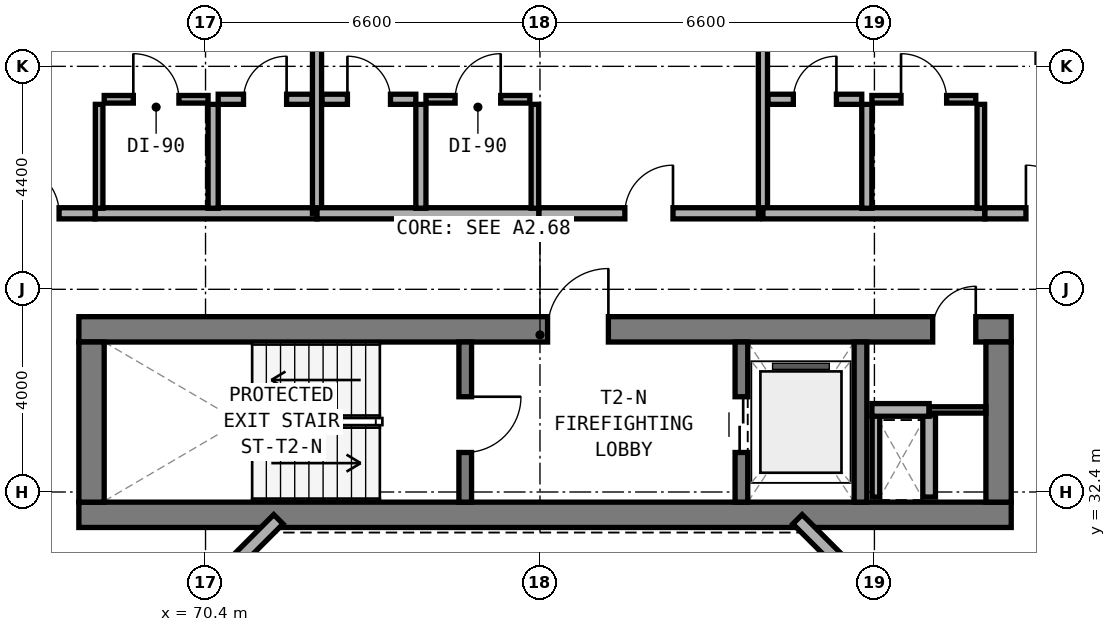
"""IFC4 building model, lengths in metres.
Left out: names, types, materials, properties, quantities, classifications, styles, units other than length and angle.
Written with IfcOpenShell. Run it as: python <this file> out.ifc"""

import sys

from ifc_helpers import new_model, si_unit, direction, frame, frame_2d, origin, place, context, subcontext, project, spatial, rectangle, extrude, element, fill, save


model = new_model("IFC4")
c1 = context("Model", 3, precision=1e-05, world=origin(), true_north=direction((0.0, 1.0)))
c2 = subcontext(c1, "Body", "Model", "MODEL_VIEW")
j1 = project(units=[si_unit("LENGTHUNIT", "METRE"), si_unit("PLANEANGLEUNIT", "RADIAN")], contexts=[c1])
p1 = place(None, origin())
s1 = spatial("IfcSite", under=j1, at=p1, CompositionType="ELEMENT")
p2 = place(p1, origin())
s2 = spatial("IfcBuilding", under=s1, at=p2, CompositionType="ELEMENT")
p3 = place(p2, frame((0.0, 0.0, 73.0)))
s3 = spatial("IfcBuildingStorey", under=s2, at=p3, CompositionType="ELEMENT", Elevation=73.0)
p4 = place(p3, frame((67.9, 31.95, 0.0), z_axis=(0.0, 0.0, 1.0), x_axis=(1.0, 0.0, 0.0)))
e1 = element("IfcWall", 1, at=p4, inside=s3, PredefinedType="SHEAR", context=c2, shape_type="SweptSolid", body=[
    extrude(rectangle(XDim=18.4, YDim=0.5, at=frame_2d((9.2, 0.0))), origin(), (0.0, 0.0, 1.0), 3.5),
])
p5 = place(p3, frame((67.9, 35.61, 0.0), z_axis=(0.0, 0.0, 1.0), x_axis=(1.0, 0.0, 0.0)))
e2 = element("IfcWall", 2, at=p5, inside=s3, PredefinedType="SHEAR", context=c2, shape_type="SweptSolid", body=[
    extrude(rectangle(XDim=18.4, YDim=0.5, at=frame_2d((9.2, 0.0))), origin(), (0.0, 0.0, 1.0), 3.5),
])
p6 = place(p5, frame((9.25, 0.0, 0.0)))
e3 = element("IfcOpeningElement", 3, at=p6, cuts=e2, PredefinedType="OPENING", context=c2, shape_type="SweptSolid", body=[
    extrude(rectangle(XDim=1.2, YDim=2.15, at=frame_2d((0.6, 1.075))), frame((0.0, 0.26, 0.0), z_axis=(0.0, -1.0, 0.0), x_axis=(1.0, 0.0, 0.0)), (0.0, 0.0, 1.0), 0.52),
])
p7 = place(p5, frame((16.85, 0.0, 0.0)))
e4 = element("IfcOpeningElement", 4, at=p7, cuts=e2, PredefinedType="OPENING", context=c2, shape_type="SweptSolid", body=[
    extrude(rectangle(XDim=0.85, YDim=2.1, at=frame_2d((0.425, 1.05))), frame((0.0, 0.26, 0.0), z_axis=(0.0, -1.0, 0.0), x_axis=(1.0, 0.0, 0.0)), (0.0, 0.0, 1.0), 0.52),
])
for number, where, z_axis, x_axis in (
    (5, (68.15, 32.2, 0.0), (0.0, 0.0, 1.0), (0.0, 1.0, 0.0)),
    (6, (86.05, 32.2, 0.0), (0.0, 0.0, 1.0), (0.0, 1.0, 0.0)),
):
    element("IfcWall", number, at=place(p3, frame(where, z_axis=z_axis, x_axis=x_axis)), inside=s3, PredefinedType="SHEAR", context=c2, shape_type="SweptSolid", body=[
        extrude(rectangle(XDim=3.16, YDim=0.5, at=frame_2d((1.58, 0.0))), origin(), (0.0, 0.0, 1.0), 3.5),
    ])
p8 = place(p3, frame((75.525, 32.2, 0.0), z_axis=(0.0, 0.0, 1.0), x_axis=(0.0, 1.0, 0.0)))
e7 = element("IfcWall", 7, at=p8, inside=s3, PredefinedType="STANDARD", context=c2, shape_type="SweptSolid", body=[
    extrude(rectangle(XDim=3.16, YDim=0.25, at=frame_2d((1.58, 0.0))), origin(), (0.0, 0.0, 1.0), 3.25),
])
p9 = place(p8, frame((0.98, 0.0, 0.0)))
e8 = element("IfcOpeningElement", 8, at=p9, cuts=e7, PredefinedType="OPENING", context=c2, shape_type="SweptSolid", body=[
    extrude(rectangle(XDim=1.1, YDim=2.15, at=frame_2d((0.55, 1.075))), frame((0.0, 0.135, 0.0), z_axis=(0.0, -1.0, 0.0), x_axis=(1.0, 0.0, 0.0)), (0.0, 0.0, 1.0), 0.27),
])
p10 = place(p3, frame((80.975, 32.2, 0.0), z_axis=(0.0, 0.0, 1.0), x_axis=(0.0, 1.0, 0.0)))
e9 = element("IfcWall", 9, at=p10, inside=s3, PredefinedType="STANDARD", context=c2, shape_type="SweptSolid", body=[
    extrude(rectangle(XDim=3.16, YDim=0.25, at=frame_2d((1.58, 0.0))), origin(), (0.0, 0.0, 1.0), 3.25),
])
p11 = place(p10, frame((0.98, 0.0, 0.0)))
e10 = element("IfcOpeningElement", 10, at=p11, cuts=e9, PredefinedType="OPENING", context=c2, shape_type="SweptSolid", body=[
    extrude(rectangle(XDim=1.1, YDim=2.15, at=frame_2d((0.55, 1.075))), frame((0.0, 0.135, 0.0), z_axis=(0.0, -1.0, 0.0), x_axis=(1.0, 0.0, 0.0)), (0.0, 0.0, 1.0), 0.27),
])
p12 = place(p3, frame((83.325, 32.2, 0.0), z_axis=(0.0, 0.0, 1.0), x_axis=(0.0, 1.0, 0.0)))
e11 = element("IfcWall", 11, at=p12, inside=s3, PredefinedType="STANDARD", context=c2, shape_type="SweptSolid", body=[
    extrude(rectangle(XDim=3.16, YDim=0.25, at=frame_2d((1.58, 0.0))), origin(), (0.0, 0.0, 1.0), 3.25),
])
for number, where, z_axis, x_axis in (
    (12, (83.716, 30.228, 0.0), (0.0, 0.0, 1.0), (-0.707, 0.707, 0.0)),
    (13, (71.838, 31.862, 0.0), (0.0, 0.0, 1.0), (-0.707, -0.707, 0.0)),
):
    element("IfcWall", number, at=place(p3, frame(where, z_axis=z_axis, x_axis=x_axis)), inside=s3, PredefinedType="STANDARD", context=c2, shape_type="SweptSolid", body=[
        extrude(rectangle(XDim=2.311, YDim=0.26, at=frame_2d((1.155, 0.0))), origin(), (0.0, 0.0, 1.0), 3.25),
    ])
p13 = place(p3, frame((83.63, 32.3, 0.0), z_axis=(0.0, 0.0, 1.0), x_axis=(0.0, 1.0, 0.0)))
e14 = element("IfcWall", 14, at=p13, inside=s3, PredefinedType="PARTITIONING", context=c2, shape_type="SweptSolid", body=[
    extrude(rectangle(XDim=1.62, YDim=0.15, at=frame_2d((0.81, 0.0))), origin(), (0.0, 0.0, 1.0), 2.725),
])
p14 = place(p3, frame((84.68, 32.3, 0.0), z_axis=(0.0, 0.0, 1.0), x_axis=(0.0, 1.0, 0.0)))
e15 = element("IfcWall", 15, at=p14, inside=s3, PredefinedType="SOLIDWALL", context=c2, shape_type="SweptSolid", body=[
    extrude(rectangle(XDim=1.62, YDim=0.25, at=frame_2d((0.81, 0.0))), origin(), (0.0, 0.0, 1.0), 3.22),
])
p15 = place(p3, frame((83.55, 34.02, 0.0), z_axis=(0.0, 0.0, 1.0), x_axis=(1.0, 0.0, 0.0)))
e16 = element("IfcWall", 16, at=p15, inside=s3, PredefinedType="SOLIDWALL", context=c2, shape_type="SweptSolid", body=[
    extrude(rectangle(XDim=1.13, YDim=0.25, at=frame_2d((0.565, 0.0))), origin(), (0.0, 0.0, 1.0), 3.22),
])
p16 = place(p3, frame((84.68, 34.02, 0.0), z_axis=(0.0, 0.0, 1.0), x_axis=(1.0, 0.0, 0.0)))
e17 = element("IfcWall", 17, at=p16, inside=s3, PredefinedType="PARTITIONING", context=c2, shape_type="SweptSolid", body=[
    extrude(rectangle(XDim=1.12, YDim=0.125, at=frame_2d((0.56, 0.0))), origin(), (0.0, 0.0, 1.0), 3.22),
])
p17 = place(p3, frame((68.22, 37.9, 0.0), z_axis=(0.0, 0.0, 1.0), x_axis=(1.0, 0.0, 0.0)))
e18 = element("IfcWall", 18, at=p17, inside=s3, PredefinedType="SOLIDWALL", context=c2, shape_type="SweptSolid", body=[
    extrude(rectangle(XDim=4.38, YDim=0.22, at=frame_2d((2.19, 0.0))), origin(), (0.0, 0.0, 1.0), 2.725),
])
p18 = place(p3, frame((65.85, 37.9, 0.0), z_axis=(0.0, 0.0, 1.0), x_axis=(1.0, 0.0, 0.0)))
e19 = element("IfcWall", 19, at=p18, inside=s3, PredefinedType="SOLIDWALL", context=c2, shape_type="SweptSolid", body=[
    extrude(rectangle(XDim=2.37, YDim=0.22, at=frame_2d((1.185, 0.0))), origin(), (0.0, 0.0, 1.0), 3.22),
])
p19 = place(p18, frame((0.71, 0.0, 0.0)))
e20 = element("IfcOpeningElement", 20, at=p19, cuts=e19, PredefinedType="OPENING", context=c2, shape_type="SweptSolid", body=[
    extrude(rectangle(XDim=0.95, YDim=2.1, at=frame_2d((0.475, 1.05))), frame((0.0, 0.12, 0.0), z_axis=(0.0, -1.0, 0.0), x_axis=(1.0, 0.0, 0.0)), (0.0, 0.0, 1.0), 0.24),
])
p20 = place(p3, frame((70.55, 38.0, 0.0), z_axis=(0.0, 0.0, 1.0), x_axis=(0.0, 1.0, 0.0)))
e21 = element("IfcWall", 21, at=p20, inside=s3, PredefinedType="PLUMBINGWALL", context=c2, shape_type="SweptSolid", body=[
    extrude(rectangle(XDim=2.05, YDim=0.2, at=frame_2d((1.025, 0.0))), origin(), (0.0, 0.0, 1.0), 3.22),
])
p21 = place(p3, frame((68.3, 38.0, 0.0), z_axis=(0.0, 0.0, 1.0), x_axis=(0.0, 1.0, 0.0)))
e22 = element("IfcWall", 22, at=p21, inside=s3, PredefinedType="PARTITIONING", context=c2, shape_type="SweptSolid", body=[
    extrude(rectangle(XDim=2.05, YDim=0.15, at=frame_2d((1.025, 0.0))), origin(), (0.0, 0.0, 1.0), 3.22),
])
p22 = place(p3, frame((70.65, 40.15, 0.0), z_axis=(0.0, 0.0, 1.0), x_axis=(1.0, 0.0, 0.0)))
e23 = element("IfcWall", 23, at=p22, inside=s3, PredefinedType="PLUMBINGWALL", context=c2, shape_type="SweptSolid", body=[
    extrude(rectangle(XDim=1.85, YDim=0.2, at=frame_2d((0.925, 0.0))), origin(), (0.0, 0.0, 1.0), 3.22),
])
p23 = place(p22, frame((0.5, 0.0, 0.0)))
e24 = element("IfcOpeningElement", 24, at=p23, cuts=e23, PredefinedType="OPENING", context=c2, shape_type="SweptSolid", body=[
    extrude(rectangle(XDim=0.85, YDim=2.1, at=frame_2d((0.425, 1.05))), frame((0.0, 0.11, 0.0), z_axis=(0.0, -1.0, 0.0), x_axis=(1.0, 0.0, 0.0)), (0.0, 0.0, 1.0), 0.22),
])
p24 = place(p3, frame((68.4, 40.15, 0.0), z_axis=(0.0, 0.0, 1.0), x_axis=(1.0, 0.0, 0.0)))
e25 = element("IfcWall", 25, at=p24, inside=s3, PredefinedType="PARTITIONING", context=c2, shape_type="SweptSolid", body=[
    extrude(rectangle(XDim=2.05, YDim=0.15, at=frame_2d((1.025, 0.0))), origin(), (0.0, 0.0, 1.0), 3.22),
])
p25 = place(p24, frame((0.575, 0.0, 0.0)))
e26 = element("IfcOpeningElement", 26, at=p25, cuts=e25, PredefinedType="OPENING", context=c2, shape_type="SweptSolid", body=[
    extrude(rectangle(XDim=0.9, YDim=2.1, at=frame_2d((0.45, 1.05))), frame((0.0, 0.085, 0.0), z_axis=(0.0, -1.0, 0.0), x_axis=(1.0, 0.0, 0.0)), (0.0, 0.0, 1.0), 0.17),
])
p26 = place(p3, frame((72.6, 37.9, 0.0), z_axis=(0.0, 0.0, 1.0), x_axis=(0.0, 1.0, 0.0)))
e27 = element("IfcWall", 27, at=p26, inside=s3, PredefinedType="SOLIDWALL", context=c2, shape_type="SweptSolid", body=[
    extrude(rectangle(XDim=7.04, YDim=0.18, at=frame_2d((3.52, 0.0))), origin(), (0.0, 0.0, 1.0), 2.725),
])
p27 = place(p3, frame((72.6, 37.9, 0.0), z_axis=(0.0, 0.0, 1.0), x_axis=(1.0, 0.0, 0.0)))
e28 = element("IfcWall", 28, at=p27, inside=s3, PredefinedType="SOLIDWALL", context=c2, shape_type="SweptSolid", body=[
    extrude(rectangle(XDim=4.38, YDim=0.22, at=frame_2d((2.19, 0.0))), origin(), (0.0, 0.0, 1.0), 2.725),
])
p28 = place(p3, frame((76.98, 37.9, 0.0), z_axis=(0.0, 0.0, 1.0), x_axis=(1.0, 0.0, 0.0)))
e29 = element("IfcWall", 29, at=p28, inside=s3, PredefinedType="SOLIDWALL", context=c2, shape_type="SweptSolid", body=[
    extrude(rectangle(XDim=4.34, YDim=0.22, at=frame_2d((2.17, 0.0))), origin(), (0.0, 0.0, 1.0), 2.725),
])
p29 = place(p28, frame((1.695, 0.0, 0.0)))
e30 = element("IfcOpeningElement", 30, at=p29, cuts=e29, PredefinedType="OPENING", context=c2, shape_type="SweptSolid", body=[
    extrude(rectangle(XDim=0.95, YDim=2.1, at=frame_2d((0.475, 1.05))), frame((0.0, 0.12, 0.0), z_axis=(0.0, -1.0, 0.0), x_axis=(1.0, 0.0, 0.0)), (0.0, 0.0, 1.0), 0.24),
])
p30 = place(p3, frame((74.65, 38.0, 0.0), z_axis=(0.0, 0.0, 1.0), x_axis=(0.0, 1.0, 0.0)))
e31 = element("IfcWall", 31, at=p30, inside=s3, PredefinedType="PLUMBINGWALL", context=c2, shape_type="SweptSolid", body=[
    extrude(rectangle(XDim=2.05, YDim=0.2, at=frame_2d((1.025, 0.0))), origin(), (0.0, 0.0, 1.0), 2.985),
])
p31 = place(p3, frame((76.9, 38.0, 0.0), z_axis=(0.0, 0.0, 1.0), x_axis=(0.0, 1.0, 0.0)))
e32 = element("IfcWall", 32, at=p31, inside=s3, PredefinedType="PARTITIONING", context=c2, shape_type="SweptSolid", body=[
    extrude(rectangle(XDim=2.05, YDim=0.15, at=frame_2d((1.025, 0.0))), origin(), (0.0, 0.0, 1.0), 2.985),
])
p32 = place(p3, frame((72.7, 40.15, 0.0), z_axis=(0.0, 0.0, 1.0), x_axis=(1.0, 0.0, 0.0)))
e33 = element("IfcWall", 33, at=p32, inside=s3, PredefinedType="PLUMBINGWALL", context=c2, shape_type="SweptSolid", body=[
    extrude(rectangle(XDim=1.85, YDim=0.2, at=frame_2d((0.925, 0.0))), origin(), (0.0, 0.0, 1.0), 3.22),
])
p33 = place(p32, frame((0.5, 0.0, 0.0)))
e34 = element("IfcOpeningElement", 34, at=p33, cuts=e33, PredefinedType="OPENING", context=c2, shape_type="SweptSolid", body=[
    extrude(rectangle(XDim=0.85, YDim=2.1, at=frame_2d((0.425, 1.05))), frame((0.0, 0.11, 0.0), z_axis=(0.0, -1.0, 0.0), x_axis=(1.0, 0.0, 0.0)), (0.0, 0.0, 1.0), 0.22),
])
p34 = place(p3, frame((74.75, 40.15, 0.0), z_axis=(0.0, 0.0, 1.0), x_axis=(1.0, 0.0, 0.0)))
e35 = element("IfcWall", 35, at=p34, inside=s3, PredefinedType="PARTITIONING", context=c2, shape_type="SweptSolid", body=[
    extrude(rectangle(XDim=2.05, YDim=0.15, at=frame_2d((1.025, 0.0))), origin(), (0.0, 0.0, 1.0), 3.22),
])
p35 = place(p34, frame((0.575, 0.0, 0.0)))
e36 = element("IfcOpeningElement", 36, at=p35, cuts=e35, PredefinedType="OPENING", context=c2, shape_type="SweptSolid", body=[
    extrude(rectangle(XDim=0.9, YDim=2.1, at=frame_2d((0.45, 1.05))), frame((0.0, 0.085, 0.0), z_axis=(0.0, -1.0, 0.0), x_axis=(1.0, 0.0, 0.0)), (0.0, 0.0, 1.0), 0.17),
])
p36 = place(p3, frame((81.4, 37.9, 0.0), z_axis=(0.0, 0.0, 1.0), x_axis=(0.0, 1.0, 0.0)))
e37 = element("IfcWall", 37, at=p36, inside=s3, PredefinedType="SOLIDWALL", context=c2, shape_type="SweptSolid", body=[
    extrude(rectangle(XDim=7.04, YDim=0.18, at=frame_2d((3.52, 0.0))), origin(), (0.0, 0.0, 1.0), 2.725),
])
p37 = place(p3, frame((81.4, 37.9, 0.0), z_axis=(0.0, 0.0, 1.0), x_axis=(1.0, 0.0, 0.0)))
e38 = element("IfcWall", 38, at=p37, inside=s3, PredefinedType="SOLIDWALL", context=c2, shape_type="SweptSolid", body=[
    extrude(rectangle(XDim=4.38, YDim=0.22, at=frame_2d((2.19, 0.0))), origin(), (0.0, 0.0, 1.0), 2.725),
])
p38 = place(p3, frame((85.78, 37.9, 0.0), z_axis=(0.0, 0.0, 1.0), x_axis=(1.0, 0.0, 0.0)))
e39 = element("IfcWall", 39, at=p38, inside=s3, PredefinedType="SOLIDWALL", context=c2, shape_type="SweptSolid", body=[
    extrude(rectangle(XDim=2.57, YDim=0.22, at=frame_2d((1.285, 0.0))), origin(), (0.0, 0.0, 1.0), 3.22),
])
p39 = place(p38, frame((0.81, 0.0, 0.0)))
e40 = element("IfcOpeningElement", 40, at=p39, cuts=e39, PredefinedType="OPENING", context=c2, shape_type="SweptSolid", body=[
    extrude(rectangle(XDim=0.95, YDim=2.1, at=frame_2d((0.475, 1.05))), frame((0.0, 0.12, 0.0), z_axis=(0.0, -1.0, 0.0), x_axis=(1.0, 0.0, 0.0)), (0.0, 0.0, 1.0), 0.24),
])
p40 = place(p3, frame((83.45, 38.0, 0.0), z_axis=(0.0, 0.0, 1.0), x_axis=(0.0, 1.0, 0.0)))
e41 = element("IfcWall", 41, at=p40, inside=s3, PredefinedType="PLUMBINGWALL", context=c2, shape_type="SweptSolid", body=[
    extrude(rectangle(XDim=2.05, YDim=0.2, at=frame_2d((1.025, 0.0))), origin(), (0.0, 0.0, 1.0), 3.22),
])
p41 = place(p3, frame((85.7, 38.0, 0.0), z_axis=(0.0, 0.0, 1.0), x_axis=(0.0, 1.0, 0.0)))
e42 = element("IfcWall", 42, at=p41, inside=s3, PredefinedType="PARTITIONING", context=c2, shape_type="SweptSolid", body=[
    extrude(rectangle(XDim=2.05, YDim=0.15, at=frame_2d((1.025, 0.0))), origin(), (0.0, 0.0, 1.0), 3.22),
])
p42 = place(p3, frame((81.5, 40.15, 0.0), z_axis=(0.0, 0.0, 1.0), x_axis=(1.0, 0.0, 0.0)))
e43 = element("IfcWall", 43, at=p42, inside=s3, PredefinedType="PLUMBINGWALL", context=c2, shape_type="SweptSolid", body=[
    extrude(rectangle(XDim=1.85, YDim=0.2, at=frame_2d((0.925, 0.0))), origin(), (0.0, 0.0, 1.0), 2.725),
])
p43 = place(p42, frame((0.5, 0.0, 0.0)))
e44 = element("IfcOpeningElement", 44, at=p43, cuts=e43, PredefinedType="OPENING", context=c2, shape_type="SweptSolid", body=[
    extrude(rectangle(XDim=0.85, YDim=2.1, at=frame_2d((0.425, 1.05))), frame((0.0, 0.11, 0.0), z_axis=(0.0, -1.0, 0.0), x_axis=(1.0, 0.0, 0.0)), (0.0, 0.0, 1.0), 0.22),
])
p44 = place(p3, frame((83.55, 40.15, 0.0), z_axis=(0.0, 0.0, 1.0), x_axis=(1.0, 0.0, 0.0)))
e45 = element("IfcWall", 45, at=p44, inside=s3, PredefinedType="PARTITIONING", context=c2, shape_type="SweptSolid", body=[
    extrude(rectangle(XDim=2.05, YDim=0.15, at=frame_2d((1.025, 0.0))), origin(), (0.0, 0.0, 1.0), 3.22),
])
p45 = place(p44, frame((0.575, 0.0, 0.0)))
e46 = element("IfcOpeningElement", 46, at=p45, cuts=e45, PredefinedType="OPENING", context=c2, shape_type="SweptSolid", body=[
    extrude(rectangle(XDim=0.9, YDim=2.1, at=frame_2d((0.45, 1.05))), frame((0.0, 0.085, 0.0), z_axis=(0.0, -1.0, 0.0), x_axis=(1.0, 0.0, 0.0)), (0.0, 0.0, 1.0), 0.17),
])
p46 = place(p9, frame((1.1, 0.0, 0.0), z_axis=(0.0, 0.0, 1.0), x_axis=(-1.0, 0.0, 0.0)))
e47 = element("IfcDoor", 47, at=p46, inside=s3, OperationType="SINGLE_SWING_LEFT", PredefinedType="DOOR", context=c2, shape_type="SweptSolid", body=[
    extrude(rectangle(XDim=1.1, YDim=2.15, at=frame_2d((0.55, 1.075))), frame((0.0, 0.025, 0.0), z_axis=(0.0, -1.0, 0.0), x_axis=(1.0, 0.0, 0.0)), (0.0, 0.0, 1.0), 0.05),
])
fill(e8, e47)
p47 = place(p6, origin())
e48 = element("IfcDoor", 48, at=p47, inside=s3, OperationType="SINGLE_SWING_RIGHT", PredefinedType="DOOR", context=c2, shape_type="SweptSolid", body=[
    extrude(rectangle(XDim=1.2, YDim=2.15, at=frame_2d((0.6, 1.075))), frame((0.0, 0.025, 0.0), z_axis=(0.0, -1.0, 0.0), x_axis=(1.0, 0.0, 0.0)), (0.0, 0.0, 1.0), 0.05),
])
fill(e3, e48)
p48 = place(p11, origin())
e49 = element("IfcDoor", 49, at=p48, inside=s3, OperationType="DOUBLE_DOOR_SLIDING", PredefinedType="DOOR", context=c2, shape_type="SweptSolid", body=[
    extrude(rectangle(XDim=1.1, YDim=2.15, at=frame_2d((0.55, 1.075))), frame((0.0, 0.025, 0.0), z_axis=(0.0, -1.0, 0.0), x_axis=(1.0, 0.0, 0.0)), (0.0, 0.0, 1.0), 0.05),
])
fill(e10, e49)
p49 = place(p7, origin())
e50 = element("IfcDoor", 50, at=p49, inside=s3, OperationType="SINGLE_SWING_RIGHT", PredefinedType="DOOR", context=c2, shape_type="SweptSolid", body=[
    extrude(rectangle(XDim=0.85, YDim=2.1, at=frame_2d((0.425, 1.05))), frame((0.0, 0.025, 0.0), z_axis=(0.0, -1.0, 0.0), x_axis=(1.0, 0.0, 0.0)), (0.0, 0.0, 1.0), 0.05),
])
fill(e4, e50)
p50 = place(p19, origin())
e51 = element("IfcDoor", 51, at=p50, inside=s3, OperationType="SINGLE_SWING_LEFT", PredefinedType="DOOR", context=c2, shape_type="SweptSolid", body=[
    extrude(rectangle(XDim=0.95, YDim=2.1, at=frame_2d((0.475, 1.05))), frame((0.0, 0.025, 0.0), z_axis=(0.0, -1.0, 0.0), x_axis=(1.0, 0.0, 0.0)), (0.0, 0.0, 1.0), 0.05),
])
fill(e20, e51)
p51 = place(p23, origin())
e52 = element("IfcDoor", 52, at=p51, inside=s3, OperationType="SINGLE_SWING_RIGHT", PredefinedType="DOOR", context=c2, shape_type="SweptSolid", body=[
    extrude(rectangle(XDim=0.85, YDim=2.1, at=frame_2d((0.425, 1.05))), frame((0.0, 0.025, 0.0), z_axis=(0.0, -1.0, 0.0), x_axis=(1.0, 0.0, 0.0)), (0.0, 0.0, 1.0), 0.05),
])
fill(e24, e52)
p52 = place(p25, origin())
e53 = element("IfcDoor", 53, at=p52, inside=s3, OperationType="SINGLE_SWING_LEFT", PredefinedType="DOOR", context=c2, shape_type="SweptSolid", body=[
    extrude(rectangle(XDim=0.9, YDim=2.1, at=frame_2d((0.45, 1.05))), frame((0.0, 0.025, 0.0), z_axis=(0.0, -1.0, 0.0), x_axis=(1.0, 0.0, 0.0)), (0.0, 0.0, 1.0), 0.05),
])
fill(e26, e53)
p53 = place(p29, origin())
e54 = element("IfcDoor", 54, at=p53, inside=s3, OperationType="SINGLE_SWING_RIGHT", PredefinedType="DOOR", context=c2, shape_type="SweptSolid", body=[
    extrude(rectangle(XDim=0.95, YDim=2.1, at=frame_2d((0.475, 1.05))), frame((0.0, 0.025, 0.0), z_axis=(0.0, -1.0, 0.0), x_axis=(1.0, 0.0, 0.0)), (0.0, 0.0, 1.0), 0.05),
])
fill(e30, e54)
p54 = place(p33, origin())
e55 = element("IfcDoor", 55, at=p54, inside=s3, OperationType="SINGLE_SWING_LEFT", PredefinedType="DOOR", context=c2, shape_type="SweptSolid", body=[
    extrude(rectangle(XDim=0.85, YDim=2.1, at=frame_2d((0.425, 1.05))), frame((0.0, 0.025, 0.0), z_axis=(0.0, -1.0, 0.0), x_axis=(1.0, 0.0, 0.0)), (0.0, 0.0, 1.0), 0.05),
])
fill(e34, e55)
p55 = place(p35, origin())
e56 = element("IfcDoor", 56, at=p55, inside=s3, OperationType="SINGLE_SWING_RIGHT", PredefinedType="DOOR", context=c2, shape_type="SweptSolid", body=[
    extrude(rectangle(XDim=0.9, YDim=2.1, at=frame_2d((0.45, 1.05))), frame((0.0, 0.025, 0.0), z_axis=(0.0, -1.0, 0.0), x_axis=(1.0, 0.0, 0.0)), (0.0, 0.0, 1.0), 0.05),
])
fill(e36, e56)
p56 = place(p39, origin())
e57 = element("IfcDoor", 57, at=p56, inside=s3, OperationType="SINGLE_SWING_LEFT", PredefinedType="DOOR", context=c2, shape_type="SweptSolid", body=[
    extrude(rectangle(XDim=0.95, YDim=2.1, at=frame_2d((0.475, 1.05))), frame((0.0, 0.025, 0.0), z_axis=(0.0, -1.0, 0.0), x_axis=(1.0, 0.0, 0.0)), (0.0, 0.0, 1.0), 0.05),
])
fill(e40, e57)
p57 = place(p43, origin())
e58 = element("IfcDoor", 58, at=p57, inside=s3, OperationType="SINGLE_SWING_RIGHT", PredefinedType="DOOR", context=c2, shape_type="SweptSolid", body=[
    extrude(rectangle(XDim=0.85, YDim=2.1, at=frame_2d((0.425, 1.05))), frame((0.0, 0.025, 0.0), z_axis=(0.0, -1.0, 0.0), x_axis=(1.0, 0.0, 0.0)), (0.0, 0.0, 1.0), 0.05),
])
fill(e44, e58)
p58 = place(p45, origin())
e59 = element("IfcDoor", 59, at=p58, inside=s3, OperationType="SINGLE_SWING_LEFT", PredefinedType="DOOR", context=c2, shape_type="SweptSolid", body=[
    extrude(rectangle(XDim=0.9, YDim=2.1, at=frame_2d((0.45, 1.05))), frame((0.0, 0.025, 0.0), z_axis=(0.0, -1.0, 0.0), x_axis=(1.0, 0.0, 0.0)), (0.0, 0.0, 1.0), 0.05),
])
fill(e46, e59)
save(model, sys.argv[1])
